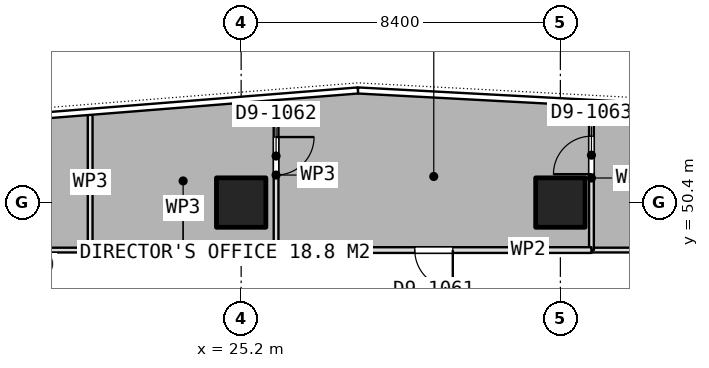
"""IFC4 building model, lengths in metres.
Left out: names, types, materials, properties, quantities, classifications, styles, units other than length and angle.
Written with IfcOpenShell. Run it as: python <this file> out.ifc"""

import sys

from ifc_helpers import new_model, si_unit, direction, frame, frame_2d, origin, origin_2d, place, context, subcontext, project, spatial, rectangle, extrude, element, fill, save


model = new_model("IFC4")
c1 = context("Model", 3, precision=1e-05, world=origin(), true_north=direction((0.0, 1.0)))
c2 = subcontext(c1, "Body", "Model", "MODEL_VIEW")
j1 = project(units=[si_unit("LENGTHUNIT", "METRE"), si_unit("PLANEANGLEUNIT", "RADIAN")], contexts=[c1])
p1 = place(None, origin())
s1 = spatial("IfcSite", under=j1, at=p1, CompositionType="ELEMENT")
p2 = place(p1, origin())
s2 = spatial("IfcBuilding", under=s1, at=p2, CompositionType="ELEMENT")
p3 = place(p2, frame((0.0, 0.0, 287.6)))
s3 = spatial("IfcBuildingStorey", under=s2, at=p3, CompositionType="ELEMENT", Elevation=287.6)
for number, where, z_axis, x_axis in (
    (1, (25.2, 50.4, 0.0), (0.0, 0.0, 1.0), (1.0, 0.0, 0.0)),
    (2, (33.6, 50.4, 0.0), (0.0, 0.0, 1.0), (1.0, 0.0, 0.0)),
):
    element("IfcColumn", number, at=place(p3, frame(where, z_axis=z_axis, x_axis=x_axis)), inside=s3, PredefinedType="COLUMN", context=c2, shape_type="SweptSolid", body=[
        extrude(rectangle(XDim=1.3, YDim=1.3, at=origin_2d()), origin(), (0.0, 0.0, 1.0), 3.75),
    ])
p4 = place(p3, frame((52.123, 49.15, 0.0), z_axis=(0.0, 0.0, 1.0), x_axis=(-1.0, 0.0, 0.0)))
e3 = element("IfcWall", 3, at=p4, inside=s3, PredefinedType="PARTITIONING", context=c2, shape_type="SweptSolid", body=[
    extrude(rectangle(XDim=17.705, YDim=0.125, at=frame_2d((8.853, 0.0))), origin(), (0.0, 0.0, 1.0), 3.45),
])
p5 = place(p3, frame((34.418, 49.15, 0.0), z_axis=(0.0, 0.0, 1.0), x_axis=(0.0, 1.0, 0.0)))
e4 = element("IfcWall", 4, at=p5, inside=s3, PredefinedType="PARTITIONING", context=c2, shape_type="SweptSolid", body=[
    extrude(rectangle(XDim=3.793, YDim=0.125, at=frame_2d((1.896, 0.0))), origin(), (0.0, 0.0, 1.0), 3.45),
])
p6 = place(p5, frame((1.997, 0.0, 0.0)))
e5 = element("IfcOpeningElement", 5, at=p6, cuts=e4, PredefinedType="OPENING", context=c2, shape_type="SweptSolid", body=[
    extrude(rectangle(XDim=1.0, YDim=2.1, at=frame_2d((0.5, 1.05))), frame((0.0, 0.073, 0.0), z_axis=(0.0, -1.0, 0.0), x_axis=(1.0, 0.0, 0.0)), (0.0, 0.0, 1.0), 0.145),
])
p7 = place(p3, frame((26.119, 53.098, 0.0), z_axis=(0.0, 0.0, 1.0), x_axis=(0.0, -1.0, 0.0)))
e6 = element("IfcWall", 6, at=p7, inside=s3, PredefinedType="PARTITIONING", context=c2, shape_type="SweptSolid", body=[
    extrude(rectangle(XDim=3.948, YDim=0.125, at=frame_2d((1.974, 0.0))), origin(), (0.0, 0.0, 1.0), 3.45),
])
p8 = place(p7, frame((0.974, 0.0, 0.0)))
e7 = element("IfcOpeningElement", 7, at=p8, cuts=e6, PredefinedType="OPENING", context=c2, shape_type="SweptSolid", body=[
    extrude(rectangle(XDim=1.0, YDim=2.1, at=frame_2d((0.5, 1.05))), frame((0.0, 0.073, 0.0), z_axis=(0.0, -1.0, 0.0), x_axis=(1.0, 0.0, 0.0)), (0.0, 0.0, 1.0), 0.145),
])
p9 = place(p3, frame((26.119, 49.15, 0.0), z_axis=(0.0, 0.0, 1.0), x_axis=(-1.0, 0.0, 0.0)))
e8 = element("IfcWall", 8, at=p9, inside=s3, PredefinedType="PARTITIONING", context=c2, shape_type="SweptSolid", body=[
    extrude(rectangle(XDim=4.892, YDim=0.125, at=frame_2d((2.446, 0.0))), origin(), (0.0, 0.0, 1.0), 3.45),
])
p10 = place(p3, frame((21.227, 49.15, 0.0), z_axis=(0.0, 0.0, 1.0), x_axis=(0.0, 1.0, 0.0)))
e9 = element("IfcWall", 9, at=p10, inside=s3, PredefinedType="PARTITIONING", context=c2, shape_type="SweptSolid", body=[
    extrude(rectangle(XDim=3.558, YDim=0.125, at=frame_2d((1.779, 0.0))), origin(), (0.0, 0.0, 1.0), 3.45),
])
p11 = place(p3, frame((21.226, 49.15, 0.0), z_axis=(0.0, 0.0, 1.0), x_axis=(-1.0, 0.0, 0.0)))
e10 = element("IfcWall", 10, at=p11, inside=s3, PredefinedType="PARTITIONING", context=c2, shape_type="SweptSolid", body=[
    extrude(rectangle(XDim=2.026, YDim=0.125, at=frame_2d((1.013, 0.0))), origin(), (0.0, 0.0, 1.0), 3.45),
])
p12 = place(p3, frame((34.418, 49.15, 0.0), z_axis=(0.0, 0.0, 1.0), x_axis=(-1.0, 0.0, 0.0)))
e11 = element("IfcWall", 11, at=p12, inside=s3, PredefinedType="PARTITIONING", context=c2, shape_type="SweptSolid", body=[
    extrude(rectangle(XDim=8.299, YDim=0.15, at=frame_2d((4.149, 0.0))), origin(), (0.0, 0.0, 1.0), 3.45),
])
p13 = place(p12, frame((3.649, 0.0, 0.0)))
e12 = element("IfcOpeningElement", 12, at=p13, cuts=e11, PredefinedType="OPENING", context=c2, shape_type="SweptSolid", body=[
    extrude(rectangle(XDim=1.0, YDim=2.1, at=frame_2d((0.5, 1.05))), frame((0.0, 0.085, 0.0), z_axis=(0.0, -1.0, 0.0), x_axis=(1.0, 0.0, 0.0)), (0.0, 0.0, 1.0), 0.17),
])
p14 = place(p6, origin())
e13 = element("IfcDoor", 13, at=p14, inside=s3, OperationType="SINGLE_SWING_LEFT", PredefinedType="DOOR", context=c2, shape_type="SweptSolid", body=[
    extrude(rectangle(XDim=1.0, YDim=2.1, at=frame_2d((0.5, 1.05))), frame((0.0, 0.025, 0.0), z_axis=(0.0, -1.0, 0.0), x_axis=(1.0, 0.0, 0.0)), (0.0, 0.0, 1.0), 0.05),
])
fill(e5, e13)
p15 = place(p8, origin())
e14 = element("IfcDoor", 14, at=p15, inside=s3, OperationType="SINGLE_SWING_LEFT", PredefinedType="DOOR", context=c2, shape_type="SweptSolid", body=[
    extrude(rectangle(XDim=1.0, YDim=2.1, at=frame_2d((0.5, 1.05))), frame((0.0, 0.025, 0.0), z_axis=(0.0, -1.0, 0.0), x_axis=(1.0, 0.0, 0.0)), (0.0, 0.0, 1.0), 0.05),
])
fill(e7, e14)
p16 = place(p13, origin())
e15 = element("IfcDoor", 15, at=p16, inside=s3, OperationType="SINGLE_SWING_LEFT", PredefinedType="DOOR", context=c2, shape_type="SweptSolid", body=[
    extrude(rectangle(XDim=1.0, YDim=2.1, at=frame_2d((0.5, 1.05))), frame((0.0, 0.025, 0.0), z_axis=(0.0, -1.0, 0.0), x_axis=(1.0, 0.0, 0.0)), (0.0, 0.0, 1.0), 0.05),
])
fill(e12, e15)
save(model, sys.argv[1])
